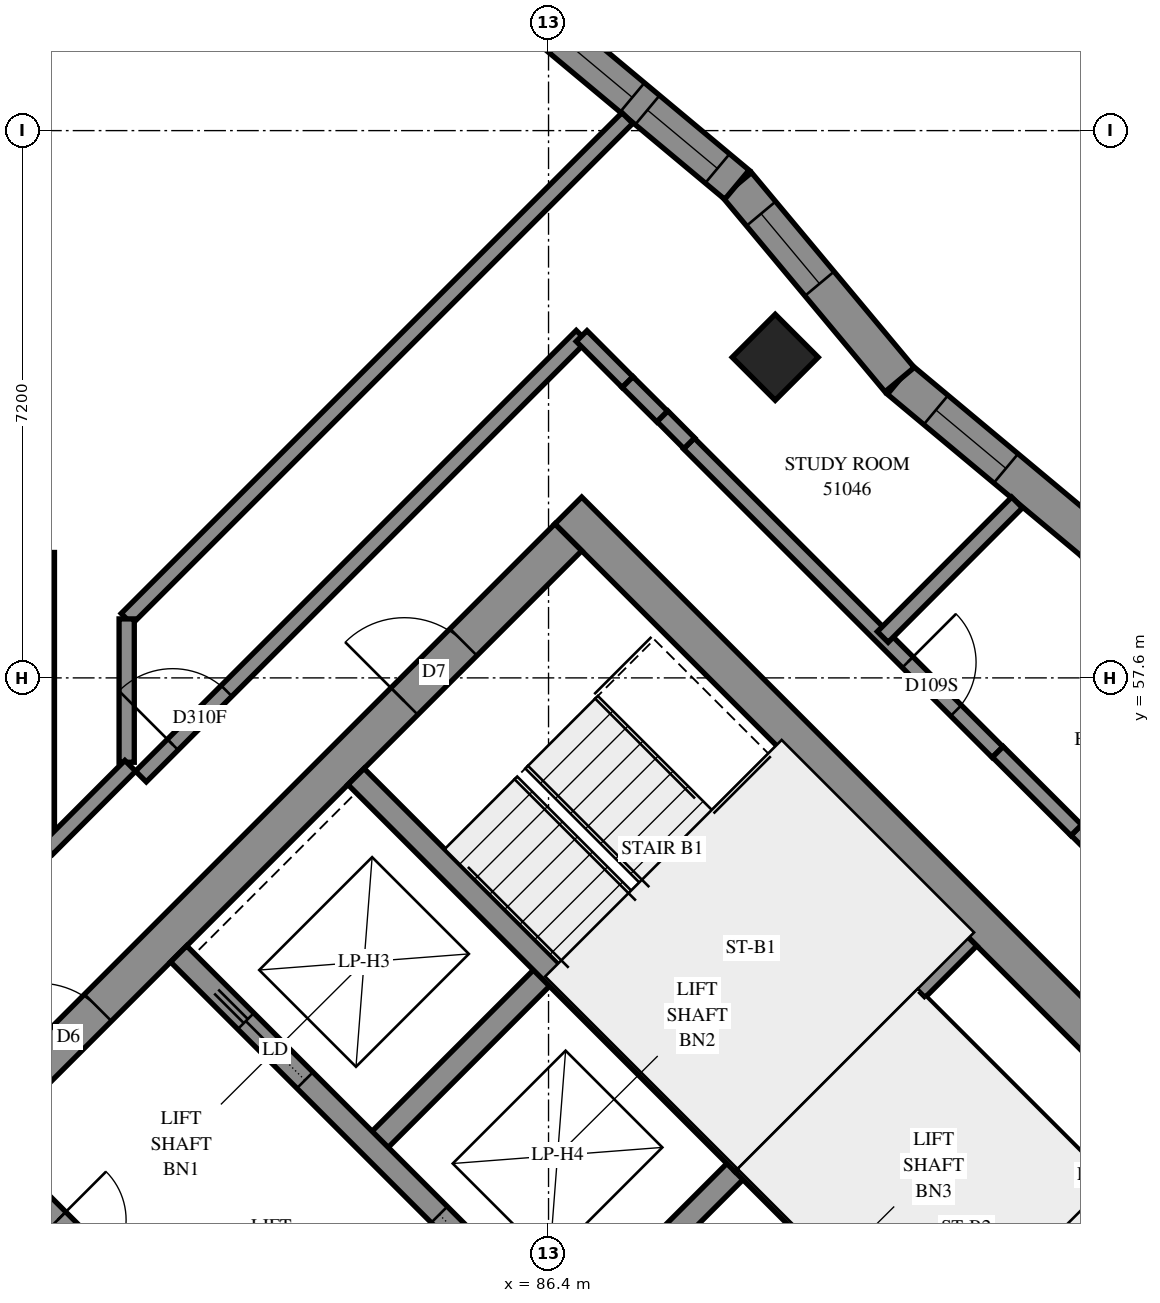
"""IFC4 building model, lengths in metres.
Left out: names, types, materials, properties, quantities, classifications, styles, units other than length and angle.
Written with IfcOpenShell. Run it as: python <this file> out.ifc"""

import sys

from ifc_helpers import new_model, si_unit, direction, frame, frame_2d, origin, origin_2d, place, context, subcontext, project, spatial, polyline, rectangle, outline, extrude, element, fill, save


model = new_model("IFC4")
c1 = context("Model", 3, precision=1e-05, world=origin(), true_north=direction((0.0, 1.0)))
c2 = subcontext(c1, "Body", "Model", "MODEL_VIEW")
j1 = project(units=[si_unit("LENGTHUNIT", "METRE"), si_unit("PLANEANGLEUNIT", "RADIAN")], contexts=[c1])
p1 = place(None, origin())
s1 = spatial("IfcSite", under=j1, at=p1, CompositionType="ELEMENT")
p2 = place(p1, origin())
s2 = spatial("IfcBuilding", under=s1, at=p2, CompositionType="ELEMENT")
p3 = place(p2, frame((0.0, 0.0, 189.6)))
s3 = spatial("IfcBuildingStorey", under=s2, at=p3, CompositionType="ELEMENT", Elevation=189.6)
p4 = place(p3, frame((89.382, 61.818, 0.0), z_axis=(0.0, 0.0, 1.0), x_axis=(0.7071067812, -0.7071067812, 0.0)))
e1 = element("IfcColumn", 1, at=p4, inside=s3, PredefinedType="COLUMN", context=c2, shape_type="SweptSolid", body=[
    extrude(rectangle(XDim=0.8, YDim=0.8, at=origin_2d()), origin(), (0.0, 0.0, 1.0), 3.1),
])
p5 = place(p3, frame((86.66, 59.802, -0.3), z_axis=(0.0, 0.0, 1.0), x_axis=(0.7071067812, -0.7071067812, 0.0)))
e2 = element("IfcWall", 2, at=p5, inside=s3, PredefinedType="SHEAR", context=c2, shape_type="SweptSolid", body=[
    extrude(rectangle(XDim=15.4, YDim=0.5, at=frame_2d((7.7, 0.0))), origin(), (0.0, 0.0, 1.0), 2.7),
])
p6 = place(p5, frame((10.5, 0.0, 0.3)))
e3 = element("IfcOpeningElement", 3, at=p6, cuts=e2, PredefinedType="OPENING", context=c2, shape_type="SweptSolid", body=[
    extrude(rectangle(XDim=0.8, YDim=2.1, at=frame_2d((0.4, 1.05))), frame((0.0, 0.26, 0.0), z_axis=(0.0, -1.0, 0.0), x_axis=(1.0, 0.0, 0.0)), (0.0, 0.0, 1.0), 0.52),
])
p7 = place(p3, frame((76.478, 49.267, -0.3), z_axis=(0.0, 0.0, 1.0), x_axis=(0.7071067812, 0.7071067812, 0.0)))
e4 = element("IfcWall", 4, at=p7, inside=s3, PredefinedType="SHEAR", context=c2, shape_type="SweptSolid", body=[
    extrude(rectangle(XDim=14.4, YDim=0.5, at=frame_2d((7.2, 0.0))), origin(), (0.0, 0.0, 1.0), 2.7),
])
p8 = place(p7, frame((4.55, 0.0, 0.3)))
e5 = element("IfcOpeningElement", 5, at=p8, cuts=e4, PredefinedType="OPENING", context=c2, shape_type="SweptSolid", body=[
    extrude(rectangle(XDim=1.1, YDim=2.1, at=frame_2d((0.55, 1.05))), frame((0.0, 0.26, 0.0), z_axis=(0.0, -1.0, 0.0), x_axis=(1.0, 0.0, 0.0)), (0.0, 0.0, 1.0), 0.52),
])
p9 = place(p7, frame((11.35, 0.0, 0.3)))
e6 = element("IfcOpeningElement", 6, at=p9, cuts=e4, PredefinedType="OPENING", context=c2, shape_type="SweptSolid", body=[
    extrude(rectangle(XDim=1.1, YDim=2.1, at=frame_2d((0.55, 1.05))), frame((0.0, 0.26, 0.0), z_axis=(0.0, -1.0, 0.0), x_axis=(1.0, 0.0, 0.0)), (0.0, 0.0, 1.0), 0.52),
])
p10 = place(p3, frame((84.079, 51.423, 0.0), z_axis=(0.0, 0.0, 1.0), x_axis=(0.7071219326, 0.7070916295, 0.0)))
e7 = element("IfcWall", 7, at=p10, inside=s3, PredefinedType="SOLIDWALL", context=c2, shape_type="SweptSolid", body=[
    extrude(rectangle(XDim=3.3, YDim=0.3, at=frame_2d((1.65, 0.0))), origin(), (0.0, 0.0, 1.0), 3.1),
])
p11 = place(p3, frame((86.625, 48.878, 0.0), z_axis=(0.0, 0.0, 1.0), x_axis=(0.7071067812, 0.7071067812, 0.0)))
e8 = element("IfcWall", 8, at=p11, inside=s3, PredefinedType="SOLIDWALL", context=c2, shape_type="SweptSolid", body=[
    extrude(rectangle(XDim=3.3, YDim=0.3, at=frame_2d((1.65, 0.0))), origin(), (0.0, 0.0, 1.0), 3.1),
])
p12 = place(p3, frame((78.988, 51.423, 0.0), z_axis=(0.0, 0.0, 1.0), x_axis=(0.7071067812, -0.7071067812, 0.0)))
e9 = element("IfcWall", 9, at=p12, inside=s3, PredefinedType="SOLIDWALL", context=c2, shape_type="SweptSolid", body=[
    extrude(rectangle(XDim=14.4, YDim=0.3, at=frame_2d((7.2, 0.0))), origin(), (0.0, 0.0, 1.0), 3.1),
])
p13 = place(p12, frame((1.35, 0.0, 0.0)))
e10 = element("IfcOpeningElement", 10, at=p13, cuts=e9, PredefinedType="OPENING", context=c2, shape_type="SweptSolid", body=[
    extrude(rectangle(XDim=0.9, YDim=2.1, at=frame_2d((0.45, 1.05))), frame((0.0, 0.16, 0.0), z_axis=(0.0, -1.0, 0.0), x_axis=(1.0, 0.0, 0.0)), (0.0, 0.0, 1.0), 0.32),
])
p14 = place(p12, frame((4.95, 0.0, 0.0)))
e11 = element("IfcOpeningElement", 11, at=p14, cuts=e9, PredefinedType="OPENING", context=c2, shape_type="SweptSolid", body=[
    extrude(rectangle(XDim=0.9, YDim=2.1, at=frame_2d((0.45, 1.05))), frame((0.0, 0.16, 0.0), z_axis=(0.0, -1.0, 0.0), x_axis=(1.0, 0.0, 0.0)), (0.0, 0.0, 1.0), 0.32),
])
p15 = place(p12, frame((8.55, 0.0, 0.0)))
e12 = element("IfcOpeningElement", 12, at=p15, cuts=e9, PredefinedType="OPENING", context=c2, shape_type="SweptSolid", body=[
    extrude(rectangle(XDim=0.9, YDim=2.1, at=frame_2d((0.45, 1.05))), frame((0.0, 0.16, 0.0), z_axis=(0.0, -1.0, 0.0), x_axis=(1.0, 0.0, 0.0)), (0.0, 0.0, 1.0), 0.32),
])
p16 = place(p12, frame((12.05, 0.0, 0.0)))
e13 = element("IfcOpeningElement", 13, at=p16, cuts=e9, PredefinedType="OPENING", context=c2, shape_type="SweptSolid", body=[
    extrude(rectangle(XDim=1.1, YDim=2.1, at=frame_2d((0.55, 1.05))), frame((0.0, 0.16, 0.0), z_axis=(0.0, -1.0, 0.0), x_axis=(1.0, 0.0, 0.0)), (0.0, 0.0, 1.0), 0.32),
])
p17 = place(p3, frame((81.534, 53.969, 0.0), z_axis=(0.0, 0.0, 1.0), x_axis=(0.707103309, -0.7071102534, 0.0)))
e14 = element("IfcWall", 14, at=p17, inside=s3, PredefinedType="SOLIDWALL", context=c2, shape_type="SweptSolid", body=[
    extrude(rectangle(XDim=14.4, YDim=0.3, at=frame_2d((7.2, 0.0))), origin(), (0.0, 0.0, 1.0), 3.1),
])
p18 = place(p17, frame((1.25, 0.0, 0.0)))
e15 = element("IfcOpeningElement", 15, at=p18, cuts=e14, PredefinedType="OPENING", context=c2, shape_type="SweptSolid", body=[
    extrude(rectangle(XDim=1.1, YDim=2.1, at=frame_2d((0.55, 1.05))), frame((0.0, 0.16, 0.0), z_axis=(0.0, -1.0, 0.0), x_axis=(1.0, 0.0, 0.0)), (0.0, 0.0, 1.0), 0.32),
])
p19 = place(p17, frame((4.85, 0.0, 0.0)))
e16 = element("IfcOpeningElement", 16, at=p19, cuts=e14, PredefinedType="OPENING", context=c2, shape_type="SweptSolid", body=[
    extrude(rectangle(XDim=1.1, YDim=2.1, at=frame_2d((0.55, 1.05))), frame((0.0, 0.16, 0.0), z_axis=(0.0, -1.0, 0.0), x_axis=(1.0, 0.0, 0.0)), (0.0, 0.0, 1.0), 0.32),
])
p20 = place(p17, frame((8.45, 0.0, 0.0)))
e17 = element("IfcOpeningElement", 17, at=p20, cuts=e14, PredefinedType="OPENING", context=c2, shape_type="SweptSolid", body=[
    extrude(rectangle(XDim=1.1, YDim=2.1, at=frame_2d((0.55, 1.05))), frame((0.0, 0.16, 0.0), z_axis=(0.0, -1.0, 0.0), x_axis=(1.0, 0.0, 0.0)), (0.0, 0.0, 1.0), 0.32),
])
p21 = place(p17, frame((12.05, 0.0, 0.0)))
e18 = element("IfcOpeningElement", 18, at=p21, cuts=e14, PredefinedType="OPENING", context=c2, shape_type="SweptSolid", body=[
    extrude(rectangle(XDim=1.1, YDim=2.1, at=frame_2d((0.55, 1.05))), frame((0.0, 0.16, 0.0), z_axis=(0.0, -1.0, 0.0), x_axis=(1.0, 0.0, 0.0)), (0.0, 0.0, 1.0), 0.32),
])
for number, where, z_axis, x_axis in (
    (19, (83.867, 56.302, 0.0), (0.0, 0.0, 1.0), (0.707, -0.707, 0.0)),
    (20, (88.958, 51.211, 0.0), (0.0, 0.0, 1.0), (0.707, -0.707, 0.0)),
):
    element("IfcWall", number, at=place(p3, frame(where, z_axis=z_axis, x_axis=x_axis)), inside=s3, PredefinedType="SOLIDWALL", context=c2, shape_type="SweptSolid", body=[
        extrude(rectangle(XDim=7.2, YDim=0.3, at=frame_2d((3.6, 0.0))), origin(), (0.0, 0.0, 1.0), 3.1),
    ])
p22 = place(p3, frame((88.958, 51.211, 0.0), z_axis=(0.0, 0.0, 1.0), x_axis=(0.7071067812, 0.7071067812, 0.0)))
e21 = element("IfcWall", 21, at=p22, inside=s3, PredefinedType="SOLIDWALL", context=c2, shape_type="SweptSolid", body=[
    extrude(rectangle(XDim=4.2, YDim=0.3, at=frame_2d((2.1, 0.0))), origin(), (0.0, 0.0, 1.0), 3.1),
])
p23 = place(p3, frame((93.583, 59.383, 0.0), z_axis=(0.0, 0.0, 1.0), x_axis=(-0.7677450318, 0.6407554652, 0.0)))
e22 = element("IfcWall", 22, at=p23, inside=s3, PredefinedType="SOLIDWALL", context=c2, shape_type="SweptSolid", body=[
    extrude(outline(polyline([(-0.022, -0.25), (3.318, -0.25), (3.363, 0.25), (0.022, 0.25), (-0.022, -0.25)])), origin(), (0.0, 0.0, 1.0), 3.1),
])
p24 = place(p23, frame((1.518, 0.0, 0.45)))
e23 = element("IfcOpeningElement", 23, at=p24, cuts=e22, PredefinedType="OPENING", context=c2, shape_type="SweptSolid", body=[
    extrude(rectangle(XDim=1.2, YDim=2.5, at=frame_2d((0.6, 1.25))), frame((0.0, 0.26, 0.0), z_axis=(0.0, -1.0, 0.0), x_axis=(1.0, 0.0, 0.0)), (0.0, 0.0, 1.0), 0.52),
])
p25 = place(p3, frame((91.019, 61.523, 0.0), z_axis=(0.0, 0.0, 1.0), x_axis=(-0.6407554652, 0.7677450318, 0.0)))
e24 = element("IfcWall", 24, at=p25, inside=s3, PredefinedType="SOLIDWALL", context=c2, shape_type="SweptSolid", body=[
    extrude(outline(polyline([(0.022, -0.25), (3.363, -0.25), (3.318, 0.25), (-0.022, 0.25), (0.022, -0.25)])), origin(), (0.0, 0.0, 1.0), 3.1),
])
p26 = place(p25, frame((1.644, 0.0, 0.45)))
e25 = element("IfcOpeningElement", 25, at=p26, cuts=e24, PredefinedType="OPENING", context=c2, shape_type="SweptSolid", body=[
    extrude(rectangle(XDim=1.2, YDim=2.5, at=frame_2d((0.6, 1.25))), frame((0.0, 0.26, 0.0), z_axis=(0.0, -1.0, 0.0), x_axis=(1.0, 0.0, 0.0)), (0.0, 0.0, 1.0), 0.52),
])
p27 = place(p3, frame((88.878, 64.088, 0.0), z_axis=(0.0, 0.0, 1.0), x_axis=(-0.7677573222, 0.6407407387, 0.0)))
e26 = element("IfcWall", 26, at=p27, inside=s3, PredefinedType="SOLIDWALL", context=c2, shape_type="SweptSolid", body=[
    extrude(outline(polyline([(-0.022, -0.25), (3.318, -0.25), (3.363, 0.25), (0.022, 0.25), (-0.022, -0.25)])), origin(), (0.0, 0.0, 1.0), 3.1),
])
p28 = place(p27, frame((0.334, 0.0, 0.45)))
e27 = element("IfcOpeningElement", 27, at=p28, cuts=e26, PredefinedType="OPENING", context=c2, shape_type="SweptSolid", body=[
    extrude(rectangle(XDim=1.2, YDim=2.5, at=frame_2d((0.6, 1.25))), frame((0.0, 0.26, 0.0), z_axis=(0.0, -1.0, 0.0), x_axis=(1.0, 0.0, 0.0)), (0.0, 0.0, 1.0), 0.52),
])
p29 = place(p27, frame((1.793, 0.0, 0.45)))
e28 = element("IfcOpeningElement", 28, at=p29, cuts=e26, PredefinedType="OPENING", context=c2, shape_type="SweptSolid", body=[
    extrude(rectangle(XDim=1.2, YDim=2.5, at=frame_2d((0.6, 1.25))), frame((0.0, 0.26, 0.0), z_axis=(0.0, -1.0, 0.0), x_axis=(1.0, 0.0, 0.0)), (0.0, 0.0, 1.0), 0.52),
])
p30 = place(p3, frame((91.313, 53.354, 0.0), z_axis=(0.0, 0.0, 1.0), x_axis=(0.7071147811, -0.7070987812, 0.0)))
e29 = element("IfcWall", 29, at=p30, inside=s3, PredefinedType="PARTITIONING", context=c2, shape_type="SweptSolid", body=[
    extrude(rectangle(XDim=6.25, YDim=0.15, at=frame_2d((3.125, 0.0))), origin(), (0.0, 0.0, 1.0), 3.1),
])
p31 = place(p3, frame((80.849, 58.377, 0.0), z_axis=(0.0, 0.0, 1.0), x_axis=(0.7071121477, 0.7071014147, 0.0)))
e30 = element("IfcWall", 30, at=p31, inside=s3, PredefinedType="PARTITIONING", context=c2, shape_type="SweptSolid", body=[
    extrude(rectangle(XDim=9.317, YDim=0.2, at=frame_2d((4.659, 0.0))), origin(), (0.0, 0.0, 1.0), 3.1),
])
p32 = place(p3, frame((93.346, 55.599, 0.0), z_axis=(0.0, 0.0, 1.0), x_axis=(0.7071067812, -0.7071067812, 0.0)))
e31 = element("IfcWall", 31, at=p32, inside=s3, PredefinedType="PARTITIONING", context=c2, shape_type="SweptSolid", body=[
    extrude(rectangle(XDim=9.201, YDim=0.2, at=frame_2d((4.601, 0.0))), origin(), (0.0, 0.0, 1.0), 3.1),
])
p33 = place(p3, frame((81.037, 56.303, 0.0), z_axis=(0.0, 0.0, 1.0), x_axis=(0.7071067812, 0.7071067812, 0.0)))
e32 = element("IfcWall", 32, at=p33, inside=s3, PredefinedType="PARTITIONING", context=c2, shape_type="SweptSolid", body=[
    extrude(rectangle(XDim=8.2, YDim=0.2, at=frame_2d((4.1, 0.0))), origin(), (0.0, 0.0, 1.0), 3.1),
])
p34 = place(p33, frame((0.592, 0.0, 0.0)))
e33 = element("IfcOpeningElement", 33, at=p34, cuts=e32, PredefinedType="OPENING", context=c2, shape_type="SweptSolid", body=[
    extrude(rectangle(XDim=1.0, YDim=2.1, at=frame_2d((0.5, 1.05))), frame((0.0, 0.11, 0.0), z_axis=(0.0, -1.0, 0.0), x_axis=(1.0, 0.0, 0.0)), (0.0, 0.0, 1.0), 0.22),
])
p35 = place(p3, frame((88.247, 60.683, 0.0), z_axis=(0.0, 0.0, 1.0), x_axis=(0.7071067812, -0.7071067812, 0.0)))
e34 = element("IfcWall", 34, at=p35, inside=s3, PredefinedType="PARTITIONING", context=c2, shape_type="SweptSolid", body=[
    extrude(rectangle(XDim=5.742, YDim=0.2, at=frame_2d((2.871, 0.0))), origin(), (0.0, 0.0, 1.0), 3.1),
])
p36 = place(p35, frame((4.069, 0.0, 0.0)))
e35 = element("IfcOpeningElement", 35, at=p36, cuts=e34, PredefinedType="OPENING", context=c2, shape_type="SweptSolid", body=[
    extrude(rectangle(XDim=0.9, YDim=2.1, at=frame_2d((0.45, 1.05))), frame((0.0, 0.11, 0.0), z_axis=(0.0, -1.0, 0.0), x_axis=(1.0, 0.0, 0.0)), (0.0, 0.0, 1.0), 0.22),
])
p37 = place(p3, frame((79.8, 55.35, 0.0), z_axis=(0.0, 0.0, 1.0), x_axis=(0.0, 1.0, 0.0)))
e36 = element("IfcWall", 36, at=p37, inside=s3, PredefinedType="PARTITIONING", context=c2, shape_type="SweptSolid", body=[
    extrude(rectangle(XDim=3.9, YDim=0.2, at=frame_2d((1.95, 0.0))), origin(), (0.0, 0.0, 1.0), 3.1),
])
p38 = place(p3, frame((90.797, 58.139, 0.0), z_axis=(0.0, 0.0, 1.0), x_axis=(0.7066467053, 0.7075665579, 0.0)))
e37 = element("IfcWall", 37, at=p38, inside=s3, PredefinedType="PARTITIONING", context=c2, shape_type="SweptSolid", body=[
    extrude(rectangle(XDim=2.5, YDim=0.2, at=frame_2d((1.25, 0.0))), origin(), (0.0, 0.0, 1.0), 3.1),
])
p39 = place(p3, frame((80.85, 56.49, 0.0), z_axis=(0.0, 0.0, 1.0), x_axis=(0.0, 1.0, 0.0)))
e38 = element("IfcWall", 38, at=p39, inside=s3, PredefinedType="PARTITIONING", context=c2, shape_type="SweptSolid", body=[
    extrude(rectangle(XDim=1.886, YDim=0.2, at=frame_2d((0.943, 0.0))), origin(), (0.0, 0.0, 1.0), 3.1),
])
p40 = place(p3, frame((79.803, 55.347, 0.0), z_axis=(0.0, 0.0, 1.0), x_axis=(0.706460727, 0.7077522457, 0.0)))
e39 = element("IfcWall", 39, at=p40, inside=s3, PredefinedType="PARTITIONING", context=c2, shape_type="SweptSolid", body=[
    extrude(rectangle(XDim=1.549, YDim=0.2, at=frame_2d((0.774, 0.0))), origin(), (0.0, 0.0, 1.0), 3.1),
])
p41 = place(p3, frame((92.311, 56.627, 0.0), z_axis=(0.0, 0.0, 1.0), x_axis=(0.7077922938, -0.7064206033, 0.0)))
e40 = element("IfcWall", 40, at=p41, inside=s3, PredefinedType="PARTITIONING", context=c2, shape_type="SweptSolid", body=[
    extrude(rectangle(XDim=1.458, YDim=0.2, at=frame_2d((0.729, 0.0))), origin(), (0.0, 0.0, 1.0), 3.1),
])
p42 = place(p3, frame((86.835, 62.097, 0.0), z_axis=(0.0, 0.0, 1.0), x_axis=(0.7059370453, -0.7082745852, 0.0)))
e41 = element("IfcWall", 41, at=p42, inside=s3, PredefinedType="PARTITIONING", context=c2, shape_type="SweptSolid", body=[
    extrude(rectangle(XDim=0.856, YDim=0.2, at=frame_2d((0.428, 0.0))), origin(), (0.0, 0.0, 1.0), 3.1),
])
p43 = place(p3, frame((87.44, 61.492, 0.0), z_axis=(0.0, 0.0, 1.0), x_axis=(0.7086591505, -0.7055509963, 0.0)))
e42 = element("IfcWall", 42, at=p43, inside=s3, PredefinedType="PARTITIONING", context=c2, shape_type="SweptSolid", body=[
    extrude(rectangle(XDim=0.643, YDim=0.2, at=frame_2d((0.322, 0.0))), origin(), (0.0, 0.0, 1.0), 3.1),
])
p44 = place(p3, frame((87.899, 61.041, 0.0), z_axis=(0.0, 0.0, 1.0), x_axis=(0.7051008166, -0.7091070712, 0.0)))
e43 = element("IfcWall", 43, at=p44, inside=s3, PredefinedType="PARTITIONING", context=c2, shape_type="SweptSolid", body=[
    extrude(rectangle(XDim=0.499, YDim=0.2, at=frame_2d((0.25, 0.0))), origin(), (0.0, 0.0, 1.0), 3.1),
])
p45 = place(p24, origin())
e44 = element("IfcWindow", 44, at=p45, inside=s3, PartitioningType="SINGLE_PANEL", PredefinedType="WINDOW", context=c2, shape_type="SweptSolid", body=[
    extrude(rectangle(XDim=1.2, YDim=2.5, at=frame_2d((0.6, 1.25))), frame((0.0, 0.18, 0.0), z_axis=(0.0, -1.0, 0.0), x_axis=(1.0, 0.0, 0.0)), (0.0, 0.0, 1.0), 0.06),
])
fill(e23, e44)
p46 = place(p26, origin())
e45 = element("IfcWindow", 45, at=p46, inside=s3, PartitioningType="SINGLE_PANEL", PredefinedType="WINDOW", context=c2, shape_type="SweptSolid", body=[
    extrude(rectangle(XDim=1.2, YDim=2.5, at=frame_2d((0.6, 1.25))), frame((0.0, 0.18, 0.0), z_axis=(0.0, -1.0, 0.0), x_axis=(1.0, 0.0, 0.0)), (0.0, 0.0, 1.0), 0.06),
])
fill(e25, e45)
p47 = place(p28, origin())
e46 = element("IfcWindow", 46, at=p47, inside=s3, PartitioningType="SINGLE_PANEL", PredefinedType="WINDOW", context=c2, shape_type="SweptSolid", body=[
    extrude(rectangle(XDim=1.2, YDim=2.5, at=frame_2d((0.6, 1.25))), frame((0.0, 0.18, 0.0), z_axis=(0.0, -1.0, 0.0), x_axis=(1.0, 0.0, 0.0)), (0.0, 0.0, 1.0), 0.06),
])
fill(e27, e46)
p48 = place(p29, origin())
e47 = element("IfcWindow", 47, at=p48, inside=s3, PartitioningType="SINGLE_PANEL", PredefinedType="WINDOW", context=c2, shape_type="SweptSolid", body=[
    extrude(rectangle(XDim=1.2, YDim=2.5, at=frame_2d((0.6, 1.25))), frame((0.0, 0.18, 0.0), z_axis=(0.0, -1.0, 0.0), x_axis=(1.0, 0.0, 0.0)), (0.0, 0.0, 1.0), 0.06),
])
fill(e28, e47)
p49 = place(p8, origin())
e48 = element("IfcDoor", 48, at=p49, inside=s3, OperationType="DOUBLE_DOOR_SINGLE_SWING", PredefinedType="DOOR", context=c2, shape_type="SweptSolid", body=[
    extrude(rectangle(XDim=1.1, YDim=2.1, at=frame_2d((0.55, 1.05))), frame((0.0, 0.025, 0.0), z_axis=(0.0, -1.0, 0.0), x_axis=(1.0, 0.0, 0.0)), (0.0, 0.0, 1.0), 0.05),
])
fill(e5, e48)
p50 = place(p9, origin())
e49 = element("IfcDoor", 49, at=p50, inside=s3, OperationType="SINGLE_SWING_LEFT", PredefinedType="DOOR", context=c2, shape_type="SweptSolid", body=[
    extrude(rectangle(XDim=1.1, YDim=2.1, at=frame_2d((0.55, 1.05))), frame((0.0, 0.025, 0.0), z_axis=(0.0, -1.0, 0.0), x_axis=(1.0, 0.0, 0.0)), (0.0, 0.0, 1.0), 0.05),
])
fill(e6, e49)
p51 = place(p13, origin())
e50 = element("IfcDoor", 50, at=p51, inside=s3, OperationType="SINGLE_SWING_LEFT", PredefinedType="DOOR", context=c2, shape_type="SweptSolid", body=[
    extrude(rectangle(XDim=0.9, YDim=2.1, at=frame_2d((0.45, 1.05))), frame((0.0, 0.025, 0.0), z_axis=(0.0, -1.0, 0.0), x_axis=(1.0, 0.0, 0.0)), (0.0, 0.0, 1.0), 0.05),
])
fill(e10, e50)
p52 = place(p18, origin())
e51 = element("IfcDoor", 51, at=p52, inside=s3, OperationType="SLIDING_TO_LEFT", PredefinedType="DOOR", context=c2, shape_type="SweptSolid", body=[
    extrude(rectangle(XDim=1.1, YDim=2.1, at=frame_2d((0.55, 1.05))), frame((0.0, 0.025, 0.0), z_axis=(0.0, -1.0, 0.0), x_axis=(1.0, 0.0, 0.0)), (0.0, 0.0, 1.0), 0.05),
])
fill(e15, e51)
p53 = place(p19, origin())
e52 = element("IfcDoor", 52, at=p53, inside=s3, OperationType="SLIDING_TO_RIGHT", PredefinedType="DOOR", context=c2, shape_type="SweptSolid", body=[
    extrude(rectangle(XDim=1.1, YDim=2.1, at=frame_2d((0.55, 1.05))), frame((0.0, 0.025, 0.0), z_axis=(0.0, -1.0, 0.0), x_axis=(1.0, 0.0, 0.0)), (0.0, 0.0, 1.0), 0.05),
])
fill(e16, e52)
p54 = place(p34, origin())
e53 = element("IfcDoor", 53, at=p54, inside=s3, OperationType="SINGLE_SWING_RIGHT", PredefinedType="DOOR", context=c2, shape_type="SweptSolid", body=[
    extrude(rectangle(XDim=1.0, YDim=2.1, at=frame_2d((0.5, 1.05))), frame((0.0, 0.025, 0.0), z_axis=(0.0, -1.0, 0.0), x_axis=(1.0, 0.0, 0.0)), (0.0, 0.0, 1.0), 0.05),
])
fill(e33, e53)
p55 = place(p36, origin())
e54 = element("IfcDoor", 54, at=p55, inside=s3, OperationType="SINGLE_SWING_RIGHT", PredefinedType="DOOR", context=c2, shape_type="SweptSolid", body=[
    extrude(rectangle(XDim=0.9, YDim=2.1, at=frame_2d((0.45, 1.05))), frame((0.0, 0.025, 0.0), z_axis=(0.0, -1.0, 0.0), x_axis=(1.0, 0.0, 0.0)), (0.0, 0.0, 1.0), 0.05),
])
fill(e35, e54)
save(model, sys.argv[1])
